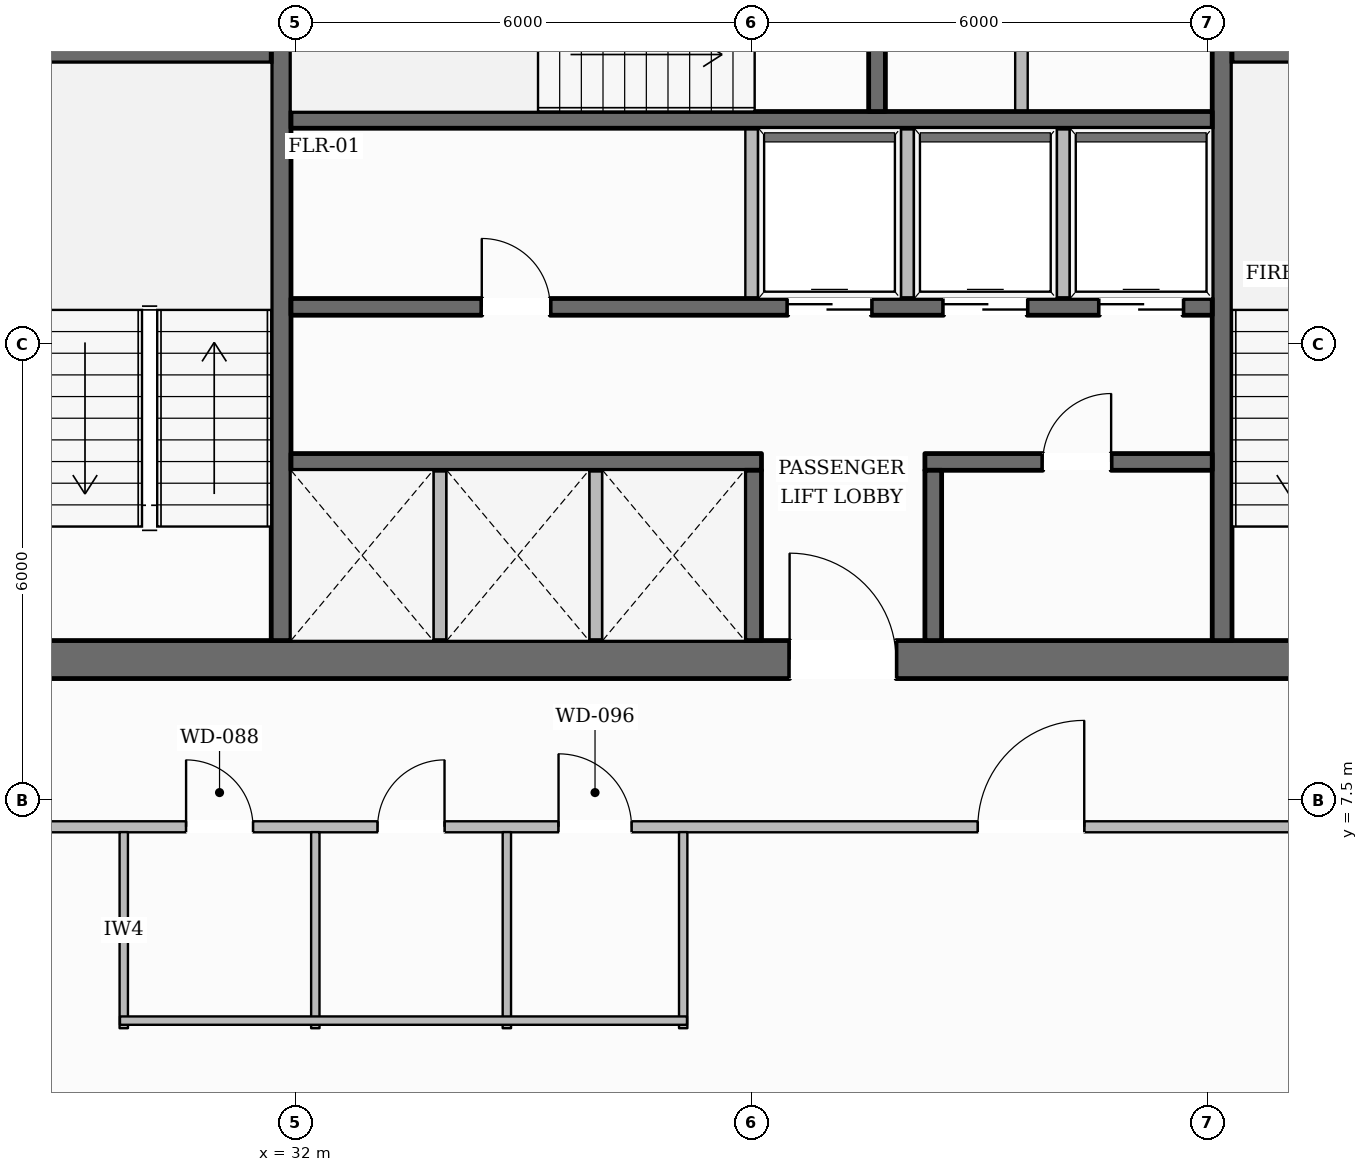
"""IFC4 building model, lengths in metres.
Left out: names, types, materials, properties, quantities, classifications, styles, units other than length and angle.
Written with IfcOpenShell. Run it as: python <this file> out.ifc"""

import sys

from ifc_helpers import new_model, si_unit, direction, frame, frame_2d, origin, place, context, subcontext, project, spatial, rectangle, extrude, element, fill, save


model = new_model("IFC4")
c1 = context("Model", 3, precision=1e-05, world=origin(), true_north=direction((0.0, 1.0)))
c2 = subcontext(c1, "Body", "Model", "MODEL_VIEW")
j1 = project(units=[si_unit("LENGTHUNIT", "METRE"), si_unit("PLANEANGLEUNIT", "RADIAN")], contexts=[c1])
p1 = place(None, origin())
s1 = spatial("IfcSite", under=j1, at=p1, CompositionType="ELEMENT")
p2 = place(p1, origin())
s2 = spatial("IfcBuilding", under=s1, at=p2, CompositionType="ELEMENT")
p3 = place(p2, frame((0.0, 0.0, 120.15)))
s3 = spatial("IfcBuildingStorey", under=s2, at=p3, CompositionType="ELEMENT", Elevation=120.15)
p4 = place(p3, frame((27.98, 9.35, 0.0), z_axis=(0.0, 0.0, 1.0), x_axis=(1.0, 0.0, 0.0)))
e1 = element("IfcWall", 1, at=p4, inside=s3, PredefinedType="SOLIDWALL", context=c2, shape_type="SweptSolid", body=[
    extrude(rectangle(XDim=20.04, YDim=0.5, at=frame_2d((10.02, 0.0))), origin(), (0.0, 0.0, 1.0), 3.6),
])
p5 = place(p4, frame((10.52, 0.0, 0.0)))
e2 = element("IfcOpeningElement", 2, at=p5, cuts=e1, PredefinedType="OPENING", context=c2, shape_type="SweptSolid", body=[
    extrude(rectangle(XDim=1.4, YDim=2.2, at=frame_2d((0.7, 1.1))), frame((0.0, 0.26, 0.0), z_axis=(0.0, -1.0, 0.0), x_axis=(1.0, 0.0, 0.0)), (0.0, 0.0, 1.0), 0.52),
])
p6 = place(p3, frame((31.81, 9.6, 0.0), z_axis=(0.0, 0.0, 1.0), x_axis=(0.0, 1.0, 0.0)))
e3 = element("IfcWall", 3, at=p6, inside=s3, PredefinedType="SHEAR", context=c2, shape_type="SweptSolid", body=[
    extrude(rectangle(XDim=13.0, YDim=0.26, at=frame_2d((6.5, 0.0))), origin(), (0.0, 0.0, 1.0), 3.6),
])
p7 = place(p6, frame((10.925, 0.0, 0.0)))
e4 = element("IfcOpeningElement", 4, at=p7, cuts=e3, PredefinedType="OPENING", context=c2, shape_type="SweptSolid", body=[
    extrude(rectangle(XDim=1.25, YDim=2.25, at=frame_2d((0.625, 1.125))), frame((0.0, 0.14, 0.0), z_axis=(0.0, -1.0, 0.0), x_axis=(1.0, 0.0, 0.0)), (0.0, 0.0, 1.0), 0.28),
])
p8 = place(p3, frame((44.19, 9.6, 0.0), z_axis=(0.0, 0.0, 1.0), x_axis=(0.0, 1.0, 0.0)))
e5 = element("IfcWall", 5, at=p8, inside=s3, PredefinedType="SHEAR", context=c2, shape_type="SweptSolid", body=[
    extrude(rectangle(XDim=13.0, YDim=0.26, at=frame_2d((6.5, 0.0))), origin(), (0.0, 0.0, 1.0), 3.6),
])
p9 = place(p8, frame((10.925, 0.0, 0.0)))
e6 = element("IfcOpeningElement", 6, at=p9, cuts=e5, PredefinedType="OPENING", context=c2, shape_type="SweptSolid", body=[
    extrude(rectangle(XDim=1.25, YDim=2.25, at=frame_2d((0.625, 1.125))), frame((0.0, 0.14, 0.0), z_axis=(0.0, -1.0, 0.0), x_axis=(1.0, 0.0, 0.0)), (0.0, 0.0, 1.0), 0.28),
])
for number, where, z_axis, x_axis in (
    (7, (28.48, 17.33, 0.0), (0.0, 0.0, 1.0), (1.0, 0.0, 0.0)),
    (8, (44.32, 17.33, 0.0), (0.0, 0.0, 1.0), (1.0, 0.0, 0.0)),
):
    element("IfcWall", number, at=place(p3, frame(where, z_axis=z_axis, x_axis=x_axis)), inside=s3, PredefinedType="SHEAR", context=c2, shape_type="SweptSolid", body=[
        extrude(rectangle(XDim=3.2, YDim=0.26, at=frame_2d((1.6, 0.0))), origin(), (0.0, 0.0, 1.0), 3.6),
    ])
p10 = place(p3, frame((31.94, 16.45, 0.0), z_axis=(0.0, 0.0, 1.0), x_axis=(1.0, 0.0, 0.0)))
e9 = element("IfcWall", 9, at=p10, inside=s3, PredefinedType="SOLIDWALL", context=c2, shape_type="SweptSolid", body=[
    extrude(rectangle(XDim=12.12, YDim=0.22, at=frame_2d((6.06, 0.0))), origin(), (0.0, 0.0, 1.0), 3.6),
])
p11 = place(p3, frame((39.65, 16.56, 0.0), z_axis=(0.0, 0.0, 1.0), x_axis=(0.0, 1.0, 0.0)))
e10 = element("IfcWall", 10, at=p11, inside=s3, PredefinedType="SOLIDWALL", context=c2, shape_type="SweptSolid", body=[
    extrude(rectangle(XDim=3.2, YDim=0.22, at=frame_2d((1.6, 0.0))), origin(), (0.0, 0.0, 1.0), 3.6),
])
p12 = place(p3, frame((31.94, 13.99, 0.0), z_axis=(0.0, 0.0, 1.0), x_axis=(1.0, 0.0, 0.0)))
e11 = element("IfcWall", 11, at=p12, inside=s3, PredefinedType="SOLIDWALL", context=c2, shape_type="SweptSolid", body=[
    extrude(rectangle(XDim=12.12, YDim=0.22, at=frame_2d((6.06, 0.0))), origin(), (0.0, 0.0, 1.0), 3.6),
])
p13 = place(p12, frame((2.51, 0.0, 0.0)))
e12 = element("IfcOpeningElement", 12, at=p13, cuts=e11, PredefinedType="OPENING", context=c2, shape_type="SweptSolid", body=[
    extrude(rectangle(XDim=0.9, YDim=2.1, at=frame_2d((0.45, 1.05))), frame((0.0, 0.12, 0.0), z_axis=(0.0, -1.0, 0.0), x_axis=(1.0, 0.0, 0.0)), (0.0, 0.0, 1.0), 0.24),
])
p14 = place(p12, frame((6.535, 0.0, 0.0)))
e13 = element("IfcOpeningElement", 13, at=p14, cuts=e11, PredefinedType="OPENING", context=c2, shape_type="SweptSolid", body=[
    extrude(rectangle(XDim=1.1, YDim=2.2, at=frame_2d((0.55, 1.1))), frame((0.0, 0.12, 0.0), z_axis=(0.0, -1.0, 0.0), x_axis=(1.0, 0.0, 0.0)), (0.0, 0.0, 1.0), 0.24),
])
p15 = place(p12, frame((8.585, 0.0, 0.0)))
e14 = element("IfcOpeningElement", 14, at=p15, cuts=e11, PredefinedType="OPENING", context=c2, shape_type="SweptSolid", body=[
    extrude(rectangle(XDim=1.1, YDim=2.2, at=frame_2d((0.55, 1.1))), frame((0.0, 0.12, 0.0), z_axis=(0.0, -1.0, 0.0), x_axis=(1.0, 0.0, 0.0)), (0.0, 0.0, 1.0), 0.24),
])
p16 = place(p12, frame((10.635, 0.0, 0.0)))
e15 = element("IfcOpeningElement", 15, at=p16, cuts=e11, PredefinedType="OPENING", context=c2, shape_type="SweptSolid", body=[
    extrude(rectangle(XDim=1.1, YDim=2.2, at=frame_2d((0.55, 1.1))), frame((0.0, 0.12, 0.0), z_axis=(0.0, -1.0, 0.0), x_axis=(1.0, 0.0, 0.0)), (0.0, 0.0, 1.0), 0.24),
])
p17 = place(p3, frame((31.94, 11.95, 0.0), z_axis=(0.0, 0.0, 1.0), x_axis=(1.0, 0.0, 0.0)))
e16 = element("IfcWall", 16, at=p17, inside=s3, PredefinedType="SOLIDWALL", context=c2, shape_type="SweptSolid", body=[
    extrude(rectangle(XDim=6.19, YDim=0.22, at=frame_2d((3.095, 0.0))), origin(), (0.0, 0.0, 1.0), 3.6),
])
p18 = place(p3, frame((40.28, 11.95, 0.0), z_axis=(0.0, 0.0, 1.0), x_axis=(1.0, 0.0, 0.0)))
e17 = element("IfcWall", 17, at=p18, inside=s3, PredefinedType="SOLIDWALL", context=c2, shape_type="SweptSolid", body=[
    extrude(rectangle(XDim=3.78, YDim=0.22, at=frame_2d((1.89, 0.0))), origin(), (0.0, 0.0, 1.0), 3.6),
])
p19 = place(p18, frame((1.55, 0.0, 0.0)))
e18 = element("IfcOpeningElement", 18, at=p19, cuts=e17, PredefinedType="OPENING", context=c2, shape_type="SweptSolid", body=[
    extrude(rectangle(XDim=0.9, YDim=2.1, at=frame_2d((0.45, 1.05))), frame((0.0, 0.12, 0.0), z_axis=(0.0, -1.0, 0.0), x_axis=(1.0, 0.0, 0.0)), (0.0, 0.0, 1.0), 0.24),
])
for number, where, z_axis, x_axis in (
    (19, (38.02, 9.6, 0.0), (0.0, 0.0, 1.0), (0.0, 1.0, 0.0)),
    (20, (40.39, 9.6, 0.0), (0.0, 0.0, 1.0), (0.0, 1.0, 0.0)),
):
    element("IfcWall", number, at=place(p3, frame(where, z_axis=z_axis, x_axis=x_axis)), inside=s3, PredefinedType="SOLIDWALL", context=c2, shape_type="SweptSolid", body=[
        extrude(rectangle(XDim=2.24, YDim=0.22, at=frame_2d((1.12, 0.0))), origin(), (0.0, 0.0, 1.0), 3.6),
    ])
p20 = place(p3, frame((13.966, 12.858, 0.0), z_axis=(0.0, 0.0, 1.0), x_axis=(0.499138995893, 0.86652193439, 0.0)))
e21 = element("IfcWall", 21, at=p20, inside=s3, PredefinedType="STANDARD", context=c2, shape_type="SweptSolid", body=[
    extrude(rectangle(XDim=36.509, YDim=0.38, at=frame_2d((18.255, 0.0))), origin(), (0.0, 0.0, 1.0), 3.059),
])
p21 = place(p20, frame((8.727, 0.0, 0.0)))
e22 = element("IfcOpeningElement", 22, at=p21, cuts=e21, PredefinedType="OPENING", context=c2, shape_type="SweptSolid", body=[
    extrude(rectangle(XDim=1.0, YDim=2.2, at=frame_2d((0.5, 1.1))), frame((0.0, 0.2, 0.0), z_axis=(0.0, -1.0, 0.0), x_axis=(1.0, 0.0, 0.0)), (0.0, 0.0, 1.0), 0.4),
])
p22 = place(p20, frame((32.292, 0.0, 0.65)))
e23 = element("IfcOpeningElement", 23, at=p22, cuts=e21, PredefinedType="OPENING", context=c2, shape_type="SweptSolid", body=[
    extrude(rectangle(XDim=1.55, YDim=1.75, at=frame_2d((0.775, 0.875))), frame((0.0, 0.2, 0.0), z_axis=(0.0, -1.0, 0.0), x_axis=(1.0, 0.0, 0.0)), (0.0, 0.0, 1.0), 0.4),
])
p23 = place(p20, frame((26.367, 0.0, 0.65)))
e24 = element("IfcOpeningElement", 24, at=p23, cuts=e21, PredefinedType="OPENING", context=c2, shape_type="SweptSolid", body=[
    extrude(rectangle(XDim=1.55, YDim=1.75, at=frame_2d((0.775, 0.875))), frame((0.0, 0.2, 0.0), z_axis=(0.0, -1.0, 0.0), x_axis=(1.0, 0.0, 0.0)), (0.0, 0.0, 1.0), 0.4),
])
p24 = place(p20, frame((20.442, 0.0, 0.65)))
e25 = element("IfcOpeningElement", 25, at=p24, cuts=e21, PredefinedType="OPENING", context=c2, shape_type="SweptSolid", body=[
    extrude(rectangle(XDim=1.55, YDim=1.75, at=frame_2d((0.775, 0.875))), frame((0.0, 0.2, 0.0), z_axis=(0.0, -1.0, 0.0), x_axis=(1.0, 0.0, 0.0)), (0.0, 0.0, 1.0), 0.4),
])
p25 = place(p20, frame((2.666, 0.0, 0.65)))
e26 = element("IfcOpeningElement", 26, at=p25, cuts=e21, PredefinedType="OPENING", context=c2, shape_type="SweptSolid", body=[
    extrude(rectangle(XDim=1.55, YDim=1.75, at=frame_2d((0.775, 0.875))), frame((0.0, 0.2, 0.0), z_axis=(0.0, -1.0, 0.0), x_axis=(1.0, 0.0, 0.0)), (0.0, 0.0, 1.0), 0.4),
])
p26 = place(p3, frame((43.959, 44.406, 0.0), z_axis=(0.0, 0.0, 1.0), x_axis=(0.50514079069, -0.863036952616, 0.0)))
e27 = element("IfcWall", 27, at=p26, inside=s3, PredefinedType="STANDARD", context=c2, shape_type="SweptSolid", body=[
    extrude(rectangle(XDim=36.948, YDim=0.38, at=frame_2d((18.474, 0.0))), origin(), (0.0, 0.0, 1.0), 3.059),
])
p27 = place(p26, frame((32.695, 0.0, 0.65)))
e28 = element("IfcOpeningElement", 28, at=p27, cuts=e27, PredefinedType="OPENING", context=c2, shape_type="SweptSolid", body=[
    extrude(rectangle(XDim=1.55, YDim=1.75, at=frame_2d((0.775, 0.875))), frame((0.0, 0.2, 0.0), z_axis=(0.0, -1.0, 0.0), x_axis=(1.0, 0.0, 0.0)), (0.0, 0.0, 1.0), 0.4),
])
p28 = place(p26, frame((26.696, 0.0, 0.65)))
e29 = element("IfcOpeningElement", 29, at=p28, cuts=e27, PredefinedType="OPENING", context=c2, shape_type="SweptSolid", body=[
    extrude(rectangle(XDim=1.55, YDim=1.75, at=frame_2d((0.775, 0.875))), frame((0.0, 0.2, 0.0), z_axis=(0.0, -1.0, 0.0), x_axis=(1.0, 0.0, 0.0)), (0.0, 0.0, 1.0), 0.4),
])
p29 = place(p26, frame((20.696, 0.0, 0.65)))
e30 = element("IfcOpeningElement", 30, at=p29, cuts=e27, PredefinedType="OPENING", context=c2, shape_type="SweptSolid", body=[
    extrude(rectangle(XDim=1.55, YDim=1.75, at=frame_2d((0.775, 0.875))), frame((0.0, 0.2, 0.0), z_axis=(0.0, -1.0, 0.0), x_axis=(1.0, 0.0, 0.0)), (0.0, 0.0, 1.0), 0.4),
])
p30 = place(p26, frame((8.697, 0.0, 0.65)))
e31 = element("IfcOpeningElement", 31, at=p30, cuts=e27, PredefinedType="OPENING", context=c2, shape_type="SweptSolid", body=[
    extrude(rectangle(XDim=1.55, YDim=1.75, at=frame_2d((0.775, 0.875))), frame((0.0, 0.2, 0.0), z_axis=(0.0, -1.0, 0.0), x_axis=(1.0, 0.0, 0.0)), (0.0, 0.0, 1.0), 0.4),
])
p31 = place(p26, frame((2.698, 0.0, 0.65)))
e32 = element("IfcOpeningElement", 32, at=p31, cuts=e27, PredefinedType="OPENING", context=c2, shape_type="SweptSolid", body=[
    extrude(rectangle(XDim=1.55, YDim=1.75, at=frame_2d((0.775, 0.875))), frame((0.0, 0.2, 0.0), z_axis=(0.0, -1.0, 0.0), x_axis=(1.0, 0.0, 0.0)), (0.0, 0.0, 1.0), 0.4),
])
for number, where, z_axis, x_axis in (
    (33, (33.9, 9.55, 0.0), (0.0, 0.0, 1.0), (0.0, 1.0, 0.0)),
    (34, (35.95, 9.55, 0.0), (0.0, 0.0, 1.0), (0.0, 1.0, 0.0)),
):
    element("IfcWall", number, at=place(p3, frame(where, z_axis=z_axis, x_axis=x_axis)), inside=s3, PredefinedType="PARTITIONING", context=c2, shape_type="SweptSolid", body=[
        extrude(rectangle(XDim=2.29, YDim=0.165, at=frame_2d((1.145, 0.0))), origin(), (0.0, 0.0, 1.0), 3.6),
    ])
for number, where, z_axis, x_axis in (
    (35, (38.0, 14.1, 0.0), (0.0, 0.0, 1.0), (0.0, 1.0, 0.0)),
    (36, (40.05, 14.1, 0.0), (0.0, 0.0, 1.0), (0.0, 1.0, 0.0)),
    (37, (42.1, 14.1, 0.0), (0.0, 0.0, 1.0), (0.0, 1.0, 0.0)),
):
    element("IfcWall", number, at=place(p3, frame(where, z_axis=z_axis, x_axis=x_axis)), inside=s3, PredefinedType="PARTITIONING", context=c2, shape_type="SweptSolid", body=[
        extrude(rectangle(XDim=2.24, YDim=0.165, at=frame_2d((1.12, 0.0))), origin(), (0.0, 0.0, 1.0), 3.6),
    ])
p32 = place(p3, frame((41.55, 16.56, 0.0), z_axis=(0.0, 0.0, 1.0), x_axis=(0.0, 1.0, 0.0)))
e38 = element("IfcWall", 38, at=p32, inside=s3, PredefinedType="PARTITIONING", context=c2, shape_type="SweptSolid", body=[
    extrude(rectangle(XDim=3.2, YDim=0.165, at=frame_2d((1.6, 0.0))), origin(), (0.0, 0.0, 1.0), 3.6),
])
p33 = place(p3, frame((26.03, 7.15, 0.0), z_axis=(0.0, 0.0, 1.0), x_axis=(1.0, 0.0, 0.0)))
e39 = element("IfcWall", 39, at=p33, inside=s3, PredefinedType="PARTITIONING", context=c2, shape_type="SweptSolid", body=[
    extrude(rectangle(XDim=23.94, YDim=0.145, at=frame_2d((11.97, 0.0))), origin(), (0.0, 0.0, 1.0), 3.6),
])
p34 = place(p33, frame((4.53, 0.0, 0.0)))
e40 = element("IfcOpeningElement", 40, at=p34, cuts=e39, PredefinedType="OPENING", context=c2, shape_type="SweptSolid", body=[
    extrude(rectangle(XDim=0.88, YDim=2.1, at=frame_2d((0.44, 1.05))), frame((0.0, 0.083, 0.0), z_axis=(0.0, -1.0, 0.0), x_axis=(1.0, 0.0, 0.0)), (0.0, 0.0, 1.0), 0.165),
])
p35 = place(p33, frame((7.05, 0.0, 0.0)))
e41 = element("IfcOpeningElement", 41, at=p35, cuts=e39, PredefinedType="OPENING", context=c2, shape_type="SweptSolid", body=[
    extrude(rectangle(XDim=0.88, YDim=2.1, at=frame_2d((0.44, 1.05))), frame((0.0, 0.083, 0.0), z_axis=(0.0, -1.0, 0.0), x_axis=(1.0, 0.0, 0.0)), (0.0, 0.0, 1.0), 0.165),
])
p36 = place(p33, frame((9.43, 0.0, 0.0)))
e42 = element("IfcOpeningElement", 42, at=p36, cuts=e39, PredefinedType="OPENING", context=c2, shape_type="SweptSolid", body=[
    extrude(rectangle(XDim=0.96, YDim=2.1, at=frame_2d((0.48, 1.05))), frame((0.0, 0.083, 0.0), z_axis=(0.0, -1.0, 0.0), x_axis=(1.0, 0.0, 0.0)), (0.0, 0.0, 1.0), 0.165),
])
p37 = place(p33, frame((14.946, 0.0, 0.0)))
e43 = element("IfcOpeningElement", 43, at=p37, cuts=e39, PredefinedType="OPENING", context=c2, shape_type="SweptSolid", body=[
    extrude(rectangle(XDim=1.4, YDim=2.2, at=frame_2d((0.7, 1.1))), frame((0.0, 0.083, 0.0), z_axis=(0.0, -1.0, 0.0), x_axis=(1.0, 0.0, 0.0)), (0.0, 0.0, 1.0), 0.165),
])
p38 = place(p3, frame((29.74, 4.5, 0.0), z_axis=(0.0, 0.0, 1.0), x_axis=(0.0, 1.0, 0.0)))
e44 = element("IfcWall", 44, at=p38, inside=s3, PredefinedType="PLUMBINGWALL", context=c2, shape_type="SweptSolid", body=[
    extrude(rectangle(XDim=2.58, YDim=0.11, at=frame_2d((1.29, 0.0))), origin(), (0.0, 0.0, 1.0), 3.6),
])
p39 = place(p3, frame((32.26, 4.5, 0.0), z_axis=(0.0, 0.0, 1.0), x_axis=(0.0, 1.0, 0.0)))
e45 = element("IfcWall", 45, at=p39, inside=s3, PredefinedType="PLUMBINGWALL", context=c2, shape_type="SweptSolid", body=[
    extrude(rectangle(XDim=2.58, YDim=0.11, at=frame_2d((1.29, 0.0))), origin(), (0.0, 0.0, 1.0), 3.141),
])
for number, where, z_axis, x_axis in (
    (46, (34.78, 4.5, 0.0), (0.0, 0.0, 1.0), (0.0, 1.0, 0.0)),
    (47, (37.1, 4.5, 0.0), (0.0, 0.0, 1.0), (0.0, 1.0, 0.0)),
):
    element("IfcWall", number, at=place(p3, frame(where, z_axis=z_axis, x_axis=x_axis)), inside=s3, PredefinedType="PLUMBINGWALL", context=c2, shape_type="SweptSolid", body=[
        extrude(rectangle(XDim=2.58, YDim=0.11, at=frame_2d((1.29, 0.0))), origin(), (0.0, 0.0, 1.0), 3.6),
    ])
p40 = place(p3, frame((29.69, 4.6, 0.0), z_axis=(0.0, 0.0, 1.0), x_axis=(1.0, 0.0, 0.0)))
e48 = element("IfcWall", 48, at=p40, inside=s3, PredefinedType="PLUMBINGWALL", context=c2, shape_type="SweptSolid", body=[
    extrude(rectangle(XDim=7.46, YDim=0.11, at=frame_2d((3.73, 0.0))), origin(), (0.0, 0.0, 1.0), 3.6),
])
p41 = place(p5, origin())
e49 = element("IfcDoor", 49, at=p41, inside=s3, OperationType="SINGLE_SWING_LEFT", PredefinedType="DOOR", context=c2, shape_type="SweptSolid", body=[
    extrude(rectangle(XDim=1.4, YDim=2.2, at=frame_2d((0.7, 1.1))), frame((0.0, 0.025, 0.0), z_axis=(0.0, -1.0, 0.0), x_axis=(1.0, 0.0, 0.0)), (0.0, 0.0, 1.0), 0.05),
])
fill(e2, e49)
p42 = place(p13, origin())
e50 = element("IfcDoor", 50, at=p42, inside=s3, OperationType="SINGLE_SWING_LEFT", PredefinedType="DOOR", context=c2, shape_type="SweptSolid", body=[
    extrude(rectangle(XDim=0.9, YDim=2.1, at=frame_2d((0.45, 1.05))), frame((0.0, 0.025, 0.0), z_axis=(0.0, -1.0, 0.0), x_axis=(1.0, 0.0, 0.0)), (0.0, 0.0, 1.0), 0.05),
])
fill(e12, e50)
p43 = place(p14, origin())
e51 = element("IfcDoor", 51, at=p43, inside=s3, OperationType="DOUBLE_DOOR_SLIDING", PredefinedType="DOOR", context=c2, shape_type="SweptSolid", body=[
    extrude(rectangle(XDim=1.1, YDim=2.2, at=frame_2d((0.55, 1.1))), frame((0.0, 0.025, 0.0), z_axis=(0.0, -1.0, 0.0), x_axis=(1.0, 0.0, 0.0)), (0.0, 0.0, 1.0), 0.05),
])
fill(e13, e51)
p44 = place(p15, origin())
e52 = element("IfcDoor", 52, at=p44, inside=s3, OperationType="DOUBLE_DOOR_SLIDING", PredefinedType="DOOR", context=c2, shape_type="SweptSolid", body=[
    extrude(rectangle(XDim=1.1, YDim=2.2, at=frame_2d((0.55, 1.1))), frame((0.0, 0.025, 0.0), z_axis=(0.0, -1.0, 0.0), x_axis=(1.0, 0.0, 0.0)), (0.0, 0.0, 1.0), 0.05),
])
fill(e14, e52)
p45 = place(p16, origin())
e53 = element("IfcDoor", 53, at=p45, inside=s3, OperationType="DOUBLE_DOOR_SLIDING", PredefinedType="DOOR", context=c2, shape_type="SweptSolid", body=[
    extrude(rectangle(XDim=1.1, YDim=2.2, at=frame_2d((0.55, 1.1))), frame((0.0, 0.025, 0.0), z_axis=(0.0, -1.0, 0.0), x_axis=(1.0, 0.0, 0.0)), (0.0, 0.0, 1.0), 0.05),
])
fill(e15, e53)
p46 = place(p19, origin())
e54 = element("IfcDoor", 54, at=p46, inside=s3, OperationType="SINGLE_SWING_RIGHT", PredefinedType="DOOR", context=c2, shape_type="SweptSolid", body=[
    extrude(rectangle(XDim=0.9, YDim=2.1, at=frame_2d((0.45, 1.05))), frame((0.0, 0.025, 0.0), z_axis=(0.0, -1.0, 0.0), x_axis=(1.0, 0.0, 0.0)), (0.0, 0.0, 1.0), 0.05),
])
fill(e18, e54)
p47 = place(p34, origin())
e55 = element("IfcDoor", 55, at=p47, inside=s3, OperationType="SINGLE_SWING_LEFT", PredefinedType="DOOR", context=c2, shape_type="SweptSolid", body=[
    extrude(rectangle(XDim=0.88, YDim=2.1, at=frame_2d((0.44, 1.05))), frame((0.0, 0.025, 0.0), z_axis=(0.0, -1.0, 0.0), x_axis=(1.0, 0.0, 0.0)), (0.0, 0.0, 1.0), 0.05),
])
fill(e40, e55)
p48 = place(p35, origin())
e56 = element("IfcDoor", 56, at=p48, inside=s3, OperationType="SINGLE_SWING_RIGHT", PredefinedType="DOOR", context=c2, shape_type="SweptSolid", body=[
    extrude(rectangle(XDim=0.88, YDim=2.1, at=frame_2d((0.44, 1.05))), frame((0.0, 0.025, 0.0), z_axis=(0.0, -1.0, 0.0), x_axis=(1.0, 0.0, 0.0)), (0.0, 0.0, 1.0), 0.05),
])
fill(e41, e56)
p49 = place(p36, origin())
e57 = element("IfcDoor", 57, at=p49, inside=s3, OperationType="SINGLE_SWING_LEFT", PredefinedType="DOOR", context=c2, shape_type="SweptSolid", body=[
    extrude(rectangle(XDim=0.96, YDim=2.1, at=frame_2d((0.48, 1.05))), frame((0.0, 0.025, 0.0), z_axis=(0.0, -1.0, 0.0), x_axis=(1.0, 0.0, 0.0)), (0.0, 0.0, 1.0), 0.05),
])
fill(e42, e57)
p50 = place(p37, origin())
e58 = element("IfcDoor", 58, at=p50, inside=s3, OperationType="SINGLE_SWING_RIGHT", PredefinedType="DOOR", context=c2, shape_type="SweptSolid", body=[
    extrude(rectangle(XDim=1.4, YDim=2.2, at=frame_2d((0.7, 1.1))), frame((0.0, 0.025, 0.0), z_axis=(0.0, -1.0, 0.0), x_axis=(1.0, 0.0, 0.0)), (0.0, 0.0, 1.0), 0.05),
])
fill(e43, e58)
save(model, sys.argv[1])
